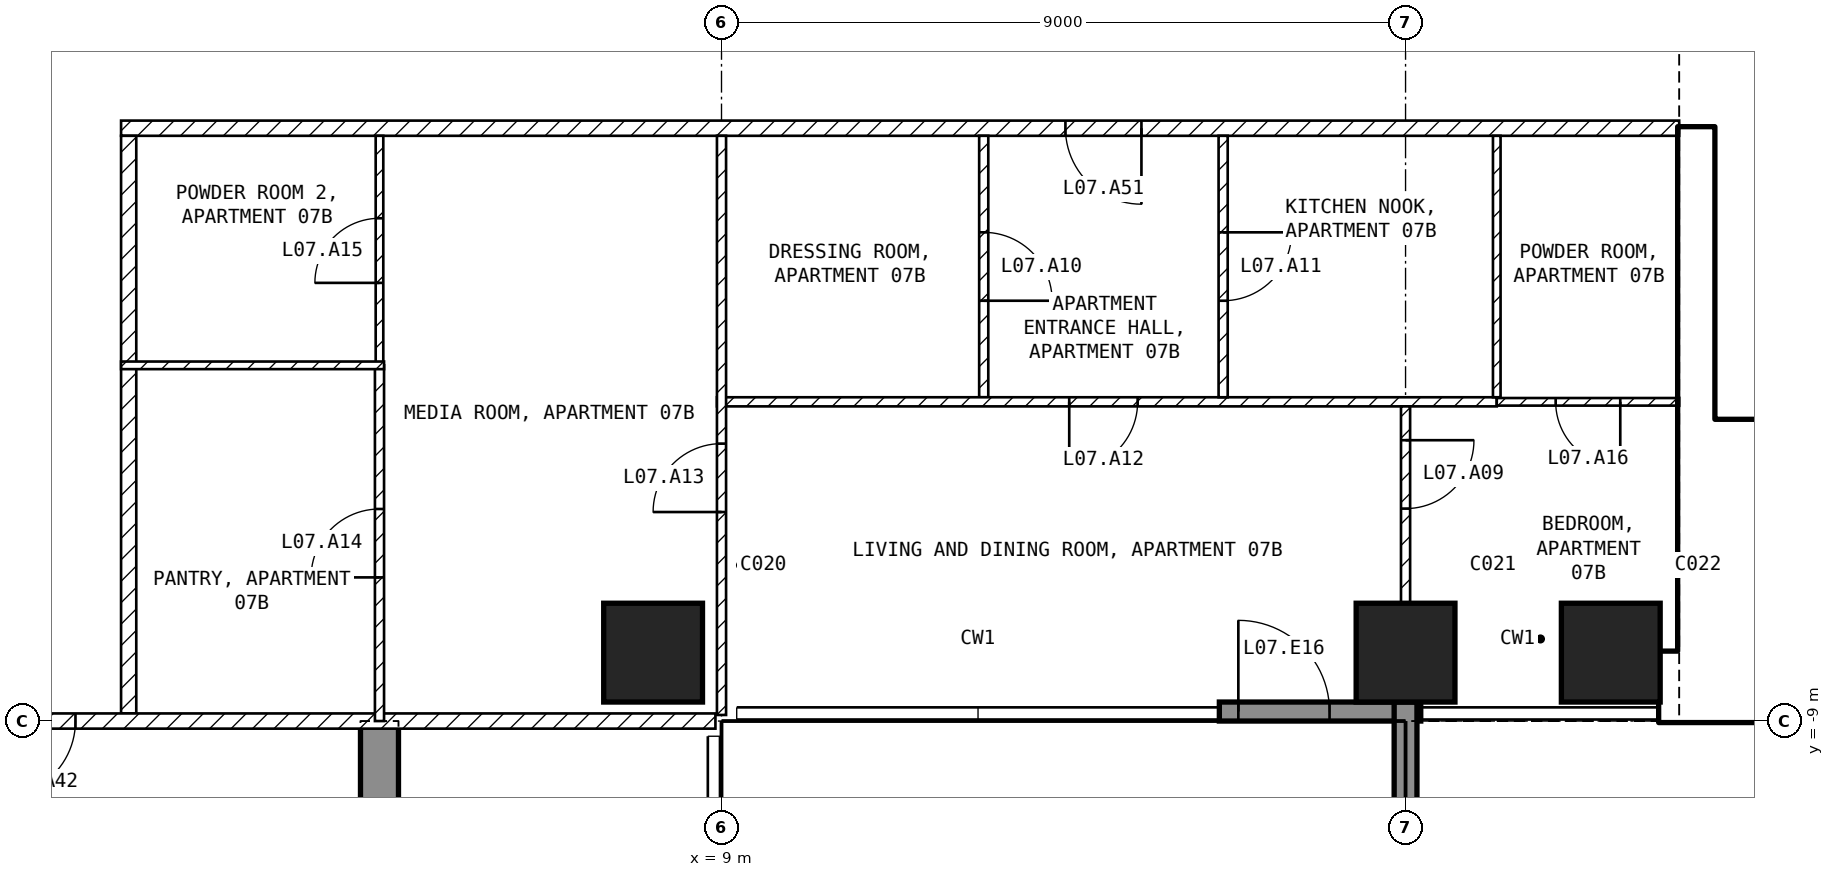
"""IFC4 building model, lengths in metres.
Left out: names, types, materials, properties, quantities, classifications, styles, units other than length and angle.
Written with IfcOpenShell. Run it as: python <this file> out.ifc"""

import sys

from ifc_helpers import new_model, si_unit, direction, frame, frame_2d, origin, origin_2d, place, context, subcontext, project, spatial, polyline, rectangle, outline, extrude, element, fill, save


model = new_model("IFC4")
c1 = context("Model", 3, precision=1e-05, world=origin(), true_north=direction((0.0, 1.0)))
c2 = subcontext(c1, "Body", "Model", "MODEL_VIEW")
j1 = project(units=[si_unit("LENGTHUNIT", "METRE"), si_unit("PLANEANGLEUNIT", "RADIAN")], contexts=[c1])
p1 = place(None, origin())
s1 = spatial("IfcSite", under=j1, at=p1, CompositionType="ELEMENT")
p2 = place(p1, origin())
s2 = spatial("IfcBuilding", under=s1, at=p2, CompositionType="ELEMENT")
p3 = place(p2, frame((0.0, 0.0, 43.5)))
s3 = spatial("IfcBuildingStorey", under=s2, at=p3, CompositionType="ELEMENT", Elevation=43.5)
for number, where, z_axis, x_axis in (
    (1, (8.1, -8.1, -0.25), (0.0, 0.0, 1.0), (1.0, 0.0, 0.0)),
    (2, (18.0, -8.1, -0.25), (0.0, 0.0, 1.0), (1.0, 0.0, 0.0)),
    (3, (20.7, -8.1, -0.25), (0.0, 0.0, 1.0), (1.0, 0.0, 0.0)),
):
    element("IfcColumn", number, at=place(p3, frame(where, z_axis=z_axis, x_axis=x_axis)), inside=s3, PredefinedType="COLUMN", context=c2, shape_type="SweptSolid", body=[
        extrude(rectangle(XDim=1.3, YDim=1.3, at=origin_2d()), origin(), (0.0, 0.0, 1.0), 3.5),
    ])
p4 = place(p3, frame((4.25, -25.45, -0.25), z_axis=(1.0, 0.0, 0.0), x_axis=(0.0, 1.0, 0.0)))
e4 = element("IfcWall", 4, at=p4, inside=s3, PredefinedType="SHEAR", context=c2, shape_type="SweptSolid", body=[
    extrude(outline(polyline([(0.0, 0.0), (4.15, 0.0), (4.15, 2.65), (6.55, 2.65), (6.55, 0.0), (11.95, 0.0), (11.95, 2.65), (14.35, 2.65), (14.35, 0.0), (16.45, 0.0), (16.45, 3.5), (0.0, 3.5), (0.0, 0.0)])), origin(), (0.0, 0.0, 1.0), 0.5),
])
p5 = place(p3, frame((15.55, -8.875, 0.0), z_axis=(0.0, 0.0, 1.0), x_axis=(1.0, 0.0, 0.0)))
e5 = element("IfcWall", 5, at=p5, inside=s3, PredefinedType="SOLIDWALL", context=c2, shape_type="SweptSolid", body=[
    extrude(rectangle(XDim=2.65, YDim=0.25, at=frame_2d((1.325, 0.0))), origin(), (0.0, 0.0, 1.0), 3.25),
])
p6 = place(p5, frame((0.25, 0.0, 0.0)))
e6 = element("IfcOpeningElement", 6, at=p6, cuts=e5, PredefinedType="OPENING", context=c2, shape_type="SweptSolid", body=[
    extrude(rectangle(XDim=1.2, YDim=2.4, at=frame_2d((0.6, 1.2))), frame((0.0, 0.135, 0.0), z_axis=(0.0, -1.0, 0.0), x_axis=(1.0, 0.0, 0.0)), (0.0, 0.0, 1.0), 0.27),
])
p7 = place(p3, frame((18.0, -8.75, 0.0), z_axis=(0.0, 0.0, 1.0), x_axis=(0.0, -1.0, 0.0)))
e7 = element("IfcWall", 7, at=p7, inside=s3, PredefinedType="SOLIDWALL", context=c2, shape_type="SweptSolid", body=[
    extrude(rectangle(XDim=2.95, YDim=0.3, at=frame_2d((1.475, 0.0))), origin(), (0.0, 0.0, 1.0), 3.25),
])
p8 = place(p3, frame((21.35, -8.55, 0.0), z_axis=(0.0, 0.0, 1.0), x_axis=(1.0, 0.0, 0.0)))
e8 = element("IfcWall", 8, at=p8, inside=s3, PredefinedType="SHEAR", context=c2, shape_type="SweptSolid", body=[
    extrude(rectangle(XDim=11.05, YDim=0.9, at=frame_2d((5.525, 0.0))), origin(), (0.0, 0.0, 1.0), 3.25),
])
p9 = place(p3, frame((21.825, -8.1, 0.0), z_axis=(0.0, 0.0, 1.0), x_axis=(0.0, 1.0, 0.0)))
e9 = element("IfcWall", 9, at=p9, inside=s3, PredefinedType="SHEAR", context=c2, shape_type="SweptSolid", body=[
    extrude(rectangle(XDim=6.9, YDim=0.45, at=frame_2d((3.45, 0.0))), origin(), (0.0, 0.0, 1.0), 3.25),
])
p10 = place(p3, frame((22.05, -5.15, 0.0), z_axis=(0.0, 0.0, 1.0), x_axis=(1.0, 0.0, 0.0)))
e10 = element("IfcWall", 10, at=p10, inside=s3, PredefinedType="SOLIDWALL", context=c2, shape_type="SweptSolid", body=[
    extrude(rectangle(XDim=6.3, YDim=0.2, at=frame_2d((3.15, 0.0))), origin(), (0.0, 0.0, 1.0), 3.25),
])
p11 = place(p10, frame((0.2, 0.0, 0.0)))
e11 = element("IfcOpeningElement", 11, at=p11, cuts=e10, PredefinedType="OPENING", context=c2, shape_type="SweptSolid", body=[
    extrude(rectangle(XDim=1.0, YDim=2.1, at=frame_2d((0.5, 1.05))), frame((0.0, 0.11, 0.0), z_axis=(0.0, -1.0, 0.0), x_axis=(1.0, 0.0, 0.0)), (0.0, 0.0, 1.0), 0.22),
])
p12 = place(p3, frame((21.6, -1.2, 0.0), z_axis=(0.0, 0.0, 1.0), x_axis=(-1.0, 0.0, 0.0)))
e12 = element("IfcWall", 12, at=p12, inside=s3, PredefinedType="PARTITIONING", context=c2, shape_type="SweptSolid", body=[
    extrude(rectangle(XDim=20.5, YDim=0.2, at=frame_2d((10.25, 0.0))), origin(), (0.0, 0.0, 1.0), 3.25),
])
p13 = place(p12, frame((7.075, 0.0, 0.0)))
e13 = element("IfcOpeningElement", 13, at=p13, cuts=e12, PredefinedType="OPENING", context=c2, shape_type="SweptSolid", body=[
    extrude(rectangle(XDim=1.0, YDim=2.1, at=frame_2d((0.5, 1.05))), frame((0.0, 0.11, 0.0), z_axis=(0.0, -1.0, 0.0), x_axis=(1.0, 0.0, 0.0)), (0.0, 0.0, 1.0), 0.22),
])
p14 = place(p3, frame((1.2, -1.3, 0.0), z_axis=(0.0, 0.0, 1.0), x_axis=(0.0, -1.0, 0.0)))
e14 = element("IfcWall", 14, at=p14, inside=s3, PredefinedType="PARTITIONING", context=c2, shape_type="SweptSolid", body=[
    extrude(rectangle(XDim=7.6, YDim=0.2, at=frame_2d((3.8, 0.0))), origin(), (0.0, 0.0, 1.0), 3.25),
])
p15 = place(p3, frame((8.92, -9.0, 0.0), z_axis=(0.0, 0.0, 1.0), x_axis=(-1.0, 0.0, 0.0)))
e15 = element("IfcWall", 15, at=p15, inside=s3, PredefinedType="PARTITIONING", context=c2, shape_type="SweptSolid", body=[
    extrude(rectangle(XDim=17.84, YDim=0.2, at=frame_2d((8.92, 0.0))), origin(), (0.0, 0.0, 1.0), 3.25),
])
p16 = place(p15, frame((8.42, 0.0, 0.0)))
e16 = element("IfcOpeningElement", 16, at=p16, cuts=e15, PredefinedType="OPENING", context=c2, shape_type="SweptSolid", body=[
    extrude(rectangle(XDim=1.0, YDim=2.1, at=frame_2d((0.5, 1.05))), frame((0.0, 0.11, 0.0), z_axis=(0.0, -1.0, 0.0), x_axis=(1.0, 0.0, 0.0)), (0.0, 0.0, 1.0), 0.22),
])
p17 = place(p3, frame((12.45, -1.3, 0.0), z_axis=(0.0, 0.0, 1.0), x_axis=(0.0, -1.0, 0.0)))
e17 = element("IfcWall", 17, at=p17, inside=s3, PredefinedType="PARTITIONING", context=c2, shape_type="SweptSolid", body=[
    extrude(rectangle(XDim=3.44, YDim=0.12, at=frame_2d((1.72, 0.0))), origin(), (0.0, 0.0, 1.0), 3.25),
])
p18 = place(p17, frame((1.27, 0.0, 0.0)))
e18 = element("IfcOpeningElement", 18, at=p18, cuts=e17, PredefinedType="OPENING", context=c2, shape_type="SweptSolid", body=[
    extrude(rectangle(XDim=0.9, YDim=2.1, at=frame_2d((0.45, 1.05))), frame((0.0, 0.07, 0.0), z_axis=(0.0, -1.0, 0.0), x_axis=(1.0, 0.0, 0.0)), (0.0, 0.0, 1.0), 0.14),
])
p19 = place(p3, frame((19.2, -4.8, 0.0), z_axis=(0.0, 0.0, 1.0), x_axis=(-1.0, 0.0, 0.0)))
e19 = element("IfcWall", 19, at=p19, inside=s3, PredefinedType="PARTITIONING", context=c2, shape_type="SweptSolid", body=[
    extrude(rectangle(XDim=10.26, YDim=0.12, at=frame_2d((5.13, 0.0))), origin(), (0.0, 0.0, 1.0), 3.25),
])
p20 = place(p19, frame((4.725, 0.0, 0.0)))
e20 = element("IfcOpeningElement", 20, at=p20, cuts=e19, PredefinedType="OPENING", context=c2, shape_type="SweptSolid", body=[
    extrude(rectangle(XDim=0.9, YDim=2.1, at=frame_2d((0.45, 1.05))), frame((0.0, 0.07, 0.0), z_axis=(0.0, -1.0, 0.0), x_axis=(1.0, 0.0, 0.0)), (0.0, 0.0, 1.0), 0.14),
])
p21 = place(p3, frame((9.0, -8.92, 0.0), z_axis=(0.0, 0.0, 1.0), x_axis=(0.0, 1.0, 0.0)))
e21 = element("IfcWall", 21, at=p21, inside=s3, PredefinedType="PARTITIONING", context=c2, shape_type="SweptSolid", body=[
    extrude(rectangle(XDim=7.62, YDim=0.12, at=frame_2d((3.81, 0.0))), origin(), (0.0, 0.0, 1.0), 3.25),
])
p22 = place(p21, frame((2.67, 0.0, 0.0)))
e22 = element("IfcOpeningElement", 22, at=p22, cuts=e21, PredefinedType="OPENING", context=c2, shape_type="SweptSolid", body=[
    extrude(rectangle(XDim=0.9, YDim=2.1, at=frame_2d((0.45, 1.05))), frame((0.0, 0.07, 0.0), z_axis=(0.0, -1.0, 0.0), x_axis=(1.0, 0.0, 0.0)), (0.0, 0.0, 1.0), 0.14),
])
p23 = place(p3, frame((15.6, -1.3, 0.0), z_axis=(0.0, 0.0, 1.0), x_axis=(0.0, -1.0, 0.0)))
e23 = element("IfcWall", 23, at=p23, inside=s3, PredefinedType="PARTITIONING", context=c2, shape_type="SweptSolid", body=[
    extrude(rectangle(XDim=3.44, YDim=0.12, at=frame_2d((1.72, 0.0))), origin(), (0.0, 0.0, 1.0), 3.25),
])
p24 = place(p23, frame((1.27, 0.0, 0.0)))
e24 = element("IfcOpeningElement", 24, at=p24, cuts=e23, PredefinedType="OPENING", context=c2, shape_type="SweptSolid", body=[
    extrude(rectangle(XDim=0.9, YDim=2.1, at=frame_2d((0.45, 1.05))), frame((0.0, 0.07, 0.0), z_axis=(0.0, -1.0, 0.0), x_axis=(1.0, 0.0, 0.0)), (0.0, 0.0, 1.0), 0.14),
])
p25 = place(p3, frame((19.2, -1.3, 0.0), z_axis=(0.0, 0.0, 1.0), x_axis=(0.0, -1.0, 0.0)))
e25 = element("IfcWall", 25, at=p25, inside=s3, PredefinedType="PARTITIONING", context=c2, shape_type="SweptSolid", body=[
    extrude(rectangle(XDim=3.44, YDim=0.1, at=frame_2d((1.72, 0.0))), origin(), (0.0, 0.0, 1.0), 3.25),
])
p26 = place(p3, frame((21.6, -4.8, 0.0), z_axis=(0.0, 0.0, 1.0), x_axis=(-1.0, 0.0, 0.0)))
e26 = element("IfcWall", 26, at=p26, inside=s3, PredefinedType="PARTITIONING", context=c2, shape_type="SweptSolid", body=[
    extrude(rectangle(XDim=2.4, YDim=0.1, at=frame_2d((1.2, 0.0))), origin(), (0.0, 0.0, 1.0), 3.25),
])
p27 = place(p26, frame((0.775, 0.0, 0.0)))
e27 = element("IfcOpeningElement", 27, at=p27, cuts=e26, PredefinedType="OPENING", context=c2, shape_type="SweptSolid", body=[
    extrude(rectangle(XDim=0.85, YDim=2.1, at=frame_2d((0.425, 1.05))), frame((0.0, 0.06, 0.0), z_axis=(0.0, -1.0, 0.0), x_axis=(1.0, 0.0, 0.0)), (0.0, 0.0, 1.0), 0.12),
])
p28 = place(p3, frame((18.0, -4.86, 0.0), z_axis=(0.0, 0.0, 1.0), x_axis=(0.0, -1.0, 0.0)))
e28 = element("IfcWall", 28, at=p28, inside=s3, PredefinedType="PARTITIONING", context=c2, shape_type="SweptSolid", body=[
    extrude(rectangle(XDim=2.59, YDim=0.12, at=frame_2d((1.295, 0.0))), origin(), (0.0, 0.0, 1.0), 2.346),
])
p29 = place(p28, frame((0.445, 0.0, 0.0)))
e29 = element("IfcOpeningElement", 29, at=p29, cuts=e28, PredefinedType="OPENING", context=c2, shape_type="SweptSolid", body=[
    extrude(rectangle(XDim=0.9, YDim=2.1, at=frame_2d((0.45, 1.05))), frame((0.0, 0.07, 0.0), z_axis=(0.0, -1.0, 0.0), x_axis=(1.0, 0.0, 0.0)), (0.0, 0.0, 1.0), 0.14),
])
p30 = place(p3, frame((4.5, -4.32, 0.0), z_axis=(0.0, 0.0, 1.0), x_axis=(0.0, 1.0, 0.0)))
e30 = element("IfcWall", 30, at=p30, inside=s3, PredefinedType="PARTITIONING", context=c2, shape_type="SweptSolid", body=[
    extrude(rectangle(XDim=3.02, YDim=0.1, at=frame_2d((1.51, 0.0))), origin(), (0.0, 0.0, 1.0), 3.25),
])
p31 = place(p30, frame((1.085, 0.0, 0.0)))
e31 = element("IfcOpeningElement", 31, at=p31, cuts=e30, PredefinedType="OPENING", context=c2, shape_type="SweptSolid", body=[
    extrude(rectangle(XDim=0.85, YDim=2.1, at=frame_2d((0.425, 1.05))), frame((0.0, 0.06, 0.0), z_axis=(0.0, -1.0, 0.0), x_axis=(1.0, 0.0, 0.0)), (0.0, 0.0, 1.0), 0.12),
])
p32 = place(p3, frame((4.5, -9.0, 0.0), z_axis=(0.0, 0.0, 1.0), x_axis=(0.0, 1.0, 0.0)))
e32 = element("IfcWall", 32, at=p32, inside=s3, PredefinedType="PARTITIONING", context=c2, shape_type="SweptSolid", body=[
    extrude(rectangle(XDim=4.68, YDim=0.12, at=frame_2d((2.34, 0.0))), origin(), (0.0, 0.0, 1.0), 3.25),
])
p33 = place(p32, frame((1.89, 0.0, 0.0)))
e33 = element("IfcOpeningElement", 33, at=p33, cuts=e32, PredefinedType="OPENING", context=c2, shape_type="SweptSolid", body=[
    extrude(rectangle(XDim=0.9, YDim=2.1, at=frame_2d((0.45, 1.05))), frame((0.0, 0.07, 0.0), z_axis=(0.0, -1.0, 0.0), x_axis=(1.0, 0.0, 0.0)), (0.0, 0.0, 1.0), 0.14),
])
p34 = place(p3, frame((4.56, -4.32, 0.0), z_axis=(0.0, 0.0, 1.0), x_axis=(-1.0, 0.0, 0.0)))
e34 = element("IfcWall", 34, at=p34, inside=s3, PredefinedType="PARTITIONING", context=c2, shape_type="SweptSolid", body=[
    extrude(rectangle(XDim=3.46, YDim=0.1, at=frame_2d((1.73, 0.0))), origin(), (0.0, 0.0, 1.0), 3.25),
])
p35 = place(p6, origin())
e35 = element("IfcDoor", 35, at=p35, inside=s3, OperationType="SINGLE_SWING_LEFT", PredefinedType="DOOR", context=c2, shape_type="SweptSolid", body=[
    extrude(rectangle(XDim=1.2, YDim=2.4, at=frame_2d((0.6, 1.2))), frame((0.0, 0.025, 0.0), z_axis=(0.0, -1.0, 0.0), x_axis=(1.0, 0.0, 0.0)), (0.0, 0.0, 1.0), 0.05),
])
fill(e6, e35)
p36 = place(p11, origin())
e36 = element("IfcDoor", 36, at=p36, inside=s3, OperationType="SINGLE_SWING_LEFT", PredefinedType="DOOR", context=c2, shape_type="SweptSolid", body=[
    extrude(rectangle(XDim=1.0, YDim=2.1, at=frame_2d((0.5, 1.05))), frame((0.0, 0.025, 0.0), z_axis=(0.0, -1.0, 0.0), x_axis=(1.0, 0.0, 0.0)), (0.0, 0.0, 1.0), 0.05),
])
fill(e11, e36)
p37 = place(p29, origin())
e37 = element("IfcDoor", 37, at=p37, inside=s3, OperationType="SINGLE_SWING_LEFT", PredefinedType="DOOR", context=c2, shape_type="SweptSolid", body=[
    extrude(rectangle(XDim=0.9, YDim=2.1, at=frame_2d((0.45, 1.05))), frame((0.0, 0.025, 0.0), z_axis=(0.0, -1.0, 0.0), x_axis=(1.0, 0.0, 0.0)), (0.0, 0.0, 1.0), 0.05),
])
fill(e29, e37)
p38 = place(p18, origin())
e38 = element("IfcDoor", 38, at=p38, inside=s3, OperationType="SINGLE_SWING_RIGHT", PredefinedType="DOOR", context=c2, shape_type="SweptSolid", body=[
    extrude(rectangle(XDim=0.9, YDim=2.1, at=frame_2d((0.45, 1.05))), frame((0.0, 0.025, 0.0), z_axis=(0.0, -1.0, 0.0), x_axis=(1.0, 0.0, 0.0)), (0.0, 0.0, 1.0), 0.05),
])
fill(e18, e38)
p39 = place(p24, origin())
e39 = element("IfcDoor", 39, at=p39, inside=s3, OperationType="SINGLE_SWING_LEFT", PredefinedType="DOOR", context=c2, shape_type="SweptSolid", body=[
    extrude(rectangle(XDim=0.9, YDim=2.1, at=frame_2d((0.45, 1.05))), frame((0.0, 0.025, 0.0), z_axis=(0.0, -1.0, 0.0), x_axis=(1.0, 0.0, 0.0)), (0.0, 0.0, 1.0), 0.05),
])
fill(e24, e39)
p40 = place(p20, origin())
e40 = element("IfcDoor", 40, at=p40, inside=s3, OperationType="SINGLE_SWING_RIGHT", PredefinedType="DOOR", context=c2, shape_type="SweptSolid", body=[
    extrude(rectangle(XDim=0.9, YDim=2.1, at=frame_2d((0.45, 1.05))), frame((0.0, 0.025, 0.0), z_axis=(0.0, -1.0, 0.0), x_axis=(1.0, 0.0, 0.0)), (0.0, 0.0, 1.0), 0.05),
])
fill(e20, e40)
p41 = place(p22, origin())
e41 = element("IfcDoor", 41, at=p41, inside=s3, OperationType="SINGLE_SWING_LEFT", PredefinedType="DOOR", context=c2, shape_type="SweptSolid", body=[
    extrude(rectangle(XDim=0.9, YDim=2.1, at=frame_2d((0.45, 1.05))), frame((0.0, 0.025, 0.0), z_axis=(0.0, -1.0, 0.0), x_axis=(1.0, 0.0, 0.0)), (0.0, 0.0, 1.0), 0.05),
])
fill(e22, e41)
p42 = place(p33, origin())
e42 = element("IfcDoor", 42, at=p42, inside=s3, OperationType="SINGLE_SWING_LEFT", PredefinedType="DOOR", context=c2, shape_type="SweptSolid", body=[
    extrude(rectangle(XDim=0.9, YDim=2.1, at=frame_2d((0.45, 1.05))), frame((0.0, 0.025, 0.0), z_axis=(0.0, -1.0, 0.0), x_axis=(1.0, 0.0, 0.0)), (0.0, 0.0, 1.0), 0.05),
])
fill(e33, e42)
p43 = place(p31, origin())
e43 = element("IfcDoor", 43, at=p43, inside=s3, OperationType="SINGLE_SWING_LEFT", PredefinedType="DOOR", context=c2, shape_type="SweptSolid", body=[
    extrude(rectangle(XDim=0.85, YDim=2.1, at=frame_2d((0.425, 1.05))), frame((0.0, 0.025, 0.0), z_axis=(0.0, -1.0, 0.0), x_axis=(1.0, 0.0, 0.0)), (0.0, 0.0, 1.0), 0.05),
])
fill(e31, e43)
p44 = place(p27, origin())
e44 = element("IfcDoor", 44, at=p44, inside=s3, OperationType="SINGLE_SWING_LEFT", PredefinedType="DOOR", context=c2, shape_type="SweptSolid", body=[
    extrude(rectangle(XDim=0.85, YDim=2.1, at=frame_2d((0.425, 1.05))), frame((0.0, 0.025, 0.0), z_axis=(0.0, -1.0, 0.0), x_axis=(1.0, 0.0, 0.0)), (0.0, 0.0, 1.0), 0.05),
])
fill(e27, e44)
p45 = place(p16, origin())
e45 = element("IfcDoor", 45, at=p45, inside=s3, OperationType="SINGLE_SWING_RIGHT", PredefinedType="DOOR", context=c2, shape_type="SweptSolid", body=[
    extrude(rectangle(XDim=1.0, YDim=2.1, at=frame_2d((0.5, 1.05))), frame((0.0, 0.025, 0.0), z_axis=(0.0, -1.0, 0.0), x_axis=(1.0, 0.0, 0.0)), (0.0, 0.0, 1.0), 0.05),
])
fill(e16, e45)
p46 = place(p13, origin())
e46 = element("IfcDoor", 46, at=p46, inside=s3, OperationType="SINGLE_SWING_LEFT", PredefinedType="DOOR", context=c2, shape_type="SweptSolid", body=[
    extrude(rectangle(XDim=1.0, YDim=2.1, at=frame_2d((0.5, 1.05))), frame((0.0, 0.025, 0.0), z_axis=(0.0, -1.0, 0.0), x_axis=(1.0, 0.0, 0.0)), (0.0, 0.0, 1.0), 0.05),
])
fill(e13, e46)
save(model, sys.argv[1])
